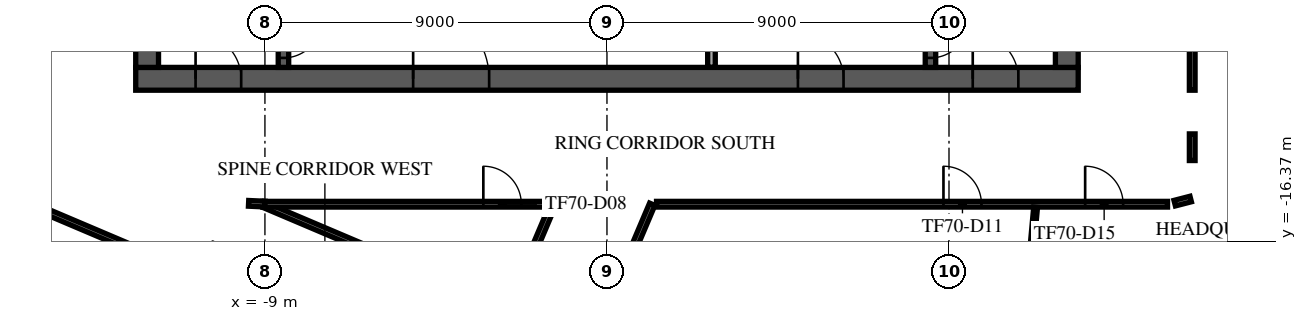
"""IFC4 building model, lengths in metres.
Left out: names, types, materials, properties, quantities, classifications, styles, units other than length and angle.
Written with IfcOpenShell. Run it as: python <this file> out.ifc"""

import sys

from ifc_helpers import new_model, si_unit, direction, frame, frame_2d, origin, place, context, subcontext, project, spatial, rectangle, extrude, element, fill, save


model = new_model("IFC4")
c1 = context("Model", 3, precision=1e-05, world=origin(), true_north=direction((0.0, 1.0)))
c2 = subcontext(c1, "Body", "Model", "MODEL_VIEW")
j1 = project(units=[si_unit("LENGTHUNIT", "METRE"), si_unit("PLANEANGLEUNIT", "RADIAN")], contexts=[c1])
p1 = place(None, origin())
s1 = spatial("IfcSite", under=j1, at=p1, CompositionType="ELEMENT")
p2 = place(p1, origin())
s2 = spatial("IfcBuilding", under=s1, at=p2, CompositionType="ELEMENT")
p3 = place(p2, frame((0.0, 0.0, 300.5)))
s3 = spatial("IfcBuildingStorey", under=s2, at=p3, CompositionType="ELEMENT", Elevation=300.5)
p4 = place(p3, frame((-12.4, -12.1, 0.0), z_axis=(0.0, 0.0, 1.0), x_axis=(1.0, 0.0, 0.0)))
e1 = element("IfcWall", 1, at=p4, inside=s3, PredefinedType="SHEAR", context=c2, shape_type="SweptSolid", body=[
    extrude(rectangle(XDim=24.8, YDim=0.6, at=frame_2d((12.4, 0.0))), origin(), (0.0, 0.0, 1.0), 3.65),
])
p5 = place(p4, frame((7.3, 0.0, 0.0)))
e2 = element("IfcOpeningElement", 2, at=p5, cuts=e1, PredefinedType="OPENING", context=c2, shape_type="SweptSolid", body=[
    extrude(rectangle(XDim=2.0, YDim=2.1, at=frame_2d((1.0, 1.05))), frame((0.0, 0.31, 0.0), z_axis=(0.0, -1.0, 0.0), x_axis=(1.0, 0.0, 0.0)), (0.0, 0.0, 1.0), 0.62),
])
p6 = place(p4, frame((17.425, 0.0, 0.0)))
e3 = element("IfcOpeningElement", 3, at=p6, cuts=e1, PredefinedType="OPENING", context=c2, shape_type="SweptSolid", body=[
    extrude(rectangle(XDim=1.2, YDim=2.1, at=frame_2d((0.6, 1.05))), frame((0.0, 0.31, 0.0), z_axis=(0.0, -1.0, 0.0), x_axis=(1.0, 0.0, 0.0)), (0.0, 0.0, 1.0), 0.62),
])
p7 = place(p4, frame((1.575, 0.0, 0.0)))
e4 = element("IfcOpeningElement", 4, at=p7, cuts=e1, PredefinedType="OPENING", context=c2, shape_type="SweptSolid", body=[
    extrude(rectangle(XDim=1.2, YDim=2.1, at=frame_2d((0.6, 1.05))), frame((0.0, 0.31, 0.0), z_axis=(0.0, -1.0, 0.0), x_axis=(1.0, 0.0, 0.0)), (0.0, 0.0, 1.0), 0.62),
])
p8 = place(p4, frame((22.025, 0.0, 0.0)))
e5 = element("IfcOpeningElement", 5, at=p8, cuts=e1, PredefinedType="OPENING", context=c2, shape_type="SweptSolid", body=[
    extrude(rectangle(XDim=1.2, YDim=2.1, at=frame_2d((0.6, 1.05))), frame((0.0, 0.31, 0.0), z_axis=(0.0, -1.0, 0.0), x_axis=(1.0, 0.0, 0.0)), (0.0, 0.0, 1.0), 0.62),
])
p9 = place(p3, frame((12.1, -11.8, 0.0), z_axis=(0.0, 0.0, 1.0), x_axis=(0.0, 1.0, 0.0)))
e6 = element("IfcWall", 6, at=p9, inside=s3, PredefinedType="SHEAR", context=c2, shape_type="SweptSolid", body=[
    extrude(rectangle(XDim=23.6, YDim=0.6, at=frame_2d((11.8, 0.0))), origin(), (0.0, 0.0, 1.0), 3.65),
])
p10 = place(p9, frame((10.6, 0.0, 0.0)))
e7 = element("IfcOpeningElement", 7, at=p10, cuts=e6, PredefinedType="OPENING", context=c2, shape_type="SweptSolid", body=[
    extrude(rectangle(XDim=2.4, YDim=2.4, at=frame_2d((1.2, 1.2))), frame((0.0, 0.31, 0.0), z_axis=(0.0, -1.0, 0.0), x_axis=(1.0, 0.0, 0.0)), (0.0, 0.0, 1.0), 0.62),
])
p11 = place(p3, frame((-12.1, -11.8, 0.0), z_axis=(0.0, 0.0, 1.0), x_axis=(0.0, 1.0, 0.0)))
e8 = element("IfcWall", 8, at=p11, inside=s3, PredefinedType="SHEAR", context=c2, shape_type="SweptSolid", body=[
    extrude(rectangle(XDim=23.6, YDim=0.6, at=frame_2d((11.8, 0.0))), origin(), (0.0, 0.0, 1.0), 3.65),
])
p12 = place(p11, frame((10.6, 0.0, 0.0)))
e9 = element("IfcOpeningElement", 9, at=p12, cuts=e8, PredefinedType="OPENING", context=c2, shape_type="SweptSolid", body=[
    extrude(rectangle(XDim=2.4, YDim=2.4, at=frame_2d((1.2, 1.2))), frame((0.0, 0.31, 0.0), z_axis=(0.0, -1.0, 0.0), x_axis=(1.0, 0.0, 0.0)), (0.0, 0.0, 1.0), 0.62),
])
p13 = place(p3, frame((-8.512, -4.55, 0.0), z_axis=(0.0, 0.0, 1.0), x_axis=(0.0, -1.0, 0.0)))
e10 = element("IfcWall", 10, at=p13, inside=s3, PredefinedType="SOLIDWALL", context=c2, shape_type="SweptSolid", body=[
    extrude(rectangle(XDim=7.25, YDim=0.275, at=frame_2d((3.625, 0.0))), origin(), (0.0, 0.0, 1.0), 3.65),
])
p14 = place(p13, frame((6.0, 0.0, 0.0)))
e11 = element("IfcOpeningElement", 11, at=p14, cuts=e10, PredefinedType="OPENING", context=c2, shape_type="SweptSolid", body=[
    extrude(rectangle(XDim=1.0, YDim=2.1, at=frame_2d((0.5, 1.05))), frame((0.0, 0.147, 0.0), z_axis=(0.0, -1.0, 0.0), x_axis=(1.0, 0.0, 0.0)), (0.0, 0.0, 1.0), 0.295),
])
p15 = place(p3, frame((8.512, -4.55, 0.0), z_axis=(0.0, 0.0, 1.0), x_axis=(0.0, -1.0, 0.0)))
e12 = element("IfcWall", 12, at=p15, inside=s3, PredefinedType="SOLIDWALL", context=c2, shape_type="SweptSolid", body=[
    extrude(rectangle(XDim=7.25, YDim=0.275, at=frame_2d((3.625, 0.0))), origin(), (0.0, 0.0, 1.0), 3.65),
])
p16 = place(p15, frame((6.0, 0.0, 0.0)))
e13 = element("IfcOpeningElement", 13, at=p16, cuts=e12, PredefinedType="OPENING", context=c2, shape_type="SweptSolid", body=[
    extrude(rectangle(XDim=1.0, YDim=2.1, at=frame_2d((0.5, 1.05))), frame((0.0, 0.147, 0.0), z_axis=(0.0, -1.0, 0.0), x_axis=(1.0, 0.0, 0.0)), (0.0, 0.0, 1.0), 0.295),
])
p17 = place(p3, frame((2.75, -11.795, 0.0), z_axis=(0.0, 0.0, 1.0), x_axis=(0.0, 1.0, 0.0)))
e14 = element("IfcWall", 14, at=p17, inside=s3, PredefinedType="PARTITIONING", context=c2, shape_type="SweptSolid", body=[
    extrude(rectangle(XDim=2.99, YDim=0.2, at=frame_2d((1.495, 0.0))), origin(), (0.0, 0.0, 1.0), 3.65),
])
p18 = place(p3, frame((15.204, -32.515, 0.0), z_axis=(0.0, 0.0, 1.0), x_axis=(0.390728997462, 0.920505758017, 0.0)))
e15 = element("IfcWall", 15, at=p18, inside=s3, PredefinedType="STANDARD", context=c2, shape_type="SweptSolid", body=[
    extrude(rectangle(XDim=47.979, YDim=0.6, at=frame_2d((23.99, 0.0))), origin(), (0.0, 0.0, 1.0), 3.65),
])
p19 = place(p18, frame((1.231, 0.0, 0.9)))
e16 = element("IfcOpeningElement", 16, at=p19, cuts=e15, PredefinedType="OPENING", context=c2, shape_type="SweptSolid", body=[
    extrude(rectangle(XDim=1.9, YDim=2.1, at=frame_2d((0.95, 1.05))), frame((0.0, 0.31, 0.0), z_axis=(0.0, -1.0, 0.0), x_axis=(1.0, 0.0, 0.0)), (0.0, 0.0, 1.0), 0.62),
])
p20 = place(p18, frame((5.593, 0.0, 0.9)))
e17 = element("IfcOpeningElement", 17, at=p20, cuts=e15, PredefinedType="OPENING", context=c2, shape_type="SweptSolid", body=[
    extrude(rectangle(XDim=1.9, YDim=2.1, at=frame_2d((0.95, 1.05))), frame((0.0, 0.31, 0.0), z_axis=(0.0, -1.0, 0.0), x_axis=(1.0, 0.0, 0.0)), (0.0, 0.0, 1.0), 0.62),
])
p21 = place(p18, frame((9.954, 0.0, 0.9)))
e18 = element("IfcOpeningElement", 18, at=p21, cuts=e15, PredefinedType="OPENING", context=c2, shape_type="SweptSolid", body=[
    extrude(rectangle(XDim=1.9, YDim=2.1, at=frame_2d((0.95, 1.05))), frame((0.0, 0.31, 0.0), z_axis=(0.0, -1.0, 0.0), x_axis=(1.0, 0.0, 0.0)), (0.0, 0.0, 1.0), 0.62),
])
p22 = place(p18, frame((14.316, 0.0, 0.9)))
e19 = element("IfcOpeningElement", 19, at=p22, cuts=e15, PredefinedType="OPENING", context=c2, shape_type="SweptSolid", body=[
    extrude(rectangle(XDim=1.9, YDim=2.1, at=frame_2d((0.95, 1.05))), frame((0.0, 0.31, 0.0), z_axis=(0.0, -1.0, 0.0), x_axis=(1.0, 0.0, 0.0)), (0.0, 0.0, 1.0), 0.62),
])
p23 = place(p18, frame((18.678, 0.0, 0.9)))
e20 = element("IfcOpeningElement", 20, at=p23, cuts=e15, PredefinedType="OPENING", context=c2, shape_type="SweptSolid", body=[
    extrude(rectangle(XDim=1.9, YDim=2.1, at=frame_2d((0.95, 1.05))), frame((0.0, 0.31, 0.0), z_axis=(0.0, -1.0, 0.0), x_axis=(1.0, 0.0, 0.0)), (0.0, 0.0, 1.0), 0.62),
])
p24 = place(p18, frame((23.04, 0.0, 0.9)))
e21 = element("IfcOpeningElement", 21, at=p24, cuts=e15, PredefinedType="OPENING", context=c2, shape_type="SweptSolid", body=[
    extrude(rectangle(XDim=1.9, YDim=2.1, at=frame_2d((0.95, 1.05))), frame((0.0, 0.31, 0.0), z_axis=(0.0, -1.0, 0.0), x_axis=(1.0, 0.0, 0.0)), (0.0, 0.0, 1.0), 0.62),
])
p25 = place(p18, frame((27.401, 0.0, 0.9)))
e22 = element("IfcOpeningElement", 22, at=p25, cuts=e15, PredefinedType="OPENING", context=c2, shape_type="SweptSolid", body=[
    extrude(rectangle(XDim=1.9, YDim=2.1, at=frame_2d((0.95, 1.05))), frame((0.0, 0.31, 0.0), z_axis=(0.0, -1.0, 0.0), x_axis=(1.0, 0.0, 0.0)), (0.0, 0.0, 1.0), 0.62),
])
p26 = place(p18, frame((31.763, 0.0, 0.9)))
e23 = element("IfcOpeningElement", 23, at=p26, cuts=e15, PredefinedType="OPENING", context=c2, shape_type="SweptSolid", body=[
    extrude(rectangle(XDim=1.9, YDim=2.1, at=frame_2d((0.95, 1.05))), frame((0.0, 0.31, 0.0), z_axis=(0.0, -1.0, 0.0), x_axis=(1.0, 0.0, 0.0)), (0.0, 0.0, 1.0), 0.62),
])
p27 = place(p18, frame((36.125, 0.0, 0.9)))
e24 = element("IfcOpeningElement", 24, at=p27, cuts=e15, PredefinedType="OPENING", context=c2, shape_type="SweptSolid", body=[
    extrude(rectangle(XDim=1.9, YDim=2.1, at=frame_2d((0.95, 1.05))), frame((0.0, 0.31, 0.0), z_axis=(0.0, -1.0, 0.0), x_axis=(1.0, 0.0, 0.0)), (0.0, 0.0, 1.0), 0.62),
])
p28 = place(p18, frame((40.487, 0.0, 0.9)))
e25 = element("IfcOpeningElement", 25, at=p28, cuts=e15, PredefinedType="OPENING", context=c2, shape_type="SweptSolid", body=[
    extrude(rectangle(XDim=1.9, YDim=2.1, at=frame_2d((0.95, 1.05))), frame((0.0, 0.31, 0.0), z_axis=(0.0, -1.0, 0.0), x_axis=(1.0, 0.0, 0.0)), (0.0, 0.0, 1.0), 0.62),
])
p29 = place(p18, frame((44.848, 0.0, 0.9)))
e26 = element("IfcOpeningElement", 26, at=p29, cuts=e15, PredefinedType="OPENING", context=c2, shape_type="SweptSolid", body=[
    extrude(rectangle(XDim=1.9, YDim=2.1, at=frame_2d((0.95, 1.05))), frame((0.0, 0.31, 0.0), z_axis=(0.0, -1.0, 0.0), x_axis=(1.0, 0.0, 0.0)), (0.0, 0.0, 1.0), 0.62),
])
p30 = place(p3, frame((-23.896, -11.711, 0.0), z_axis=(0.0, 0.0, 1.0), x_axis=(0.920507643781, -0.390724554821, 0.0)))
e27 = element("IfcWall", 27, at=p30, inside=s3, PredefinedType="PARTITIONING", context=c2, shape_type="SweptSolid", body=[
    extrude(rectangle(XDim=34.917, YDim=0.15, at=frame_2d((17.458, 0.0))), origin(), (0.0, 0.0, 1.0), 3.25),
])
p31 = place(p30, frame((7.05, 0.0, 0.0)))
e28 = element("IfcOpeningElement", 28, at=p31, cuts=e27, PredefinedType="OPENING", context=c2, shape_type="SweptSolid", body=[
    extrude(rectangle(XDim=1.8, YDim=2.1, at=frame_2d((0.9, 1.05))), frame((0.0, 0.085, 0.0), z_axis=(0.0, -1.0, 0.0), x_axis=(1.0, 0.0, 0.0)), (0.0, 0.0, 1.0), 0.17),
])
p32 = place(p30, frame((14.27, 0.0, 0.0)))
e29 = element("IfcOpeningElement", 29, at=p32, cuts=e27, PredefinedType="OPENING", context=c2, shape_type="SweptSolid", body=[
    extrude(rectangle(XDim=1.0, YDim=2.1, at=frame_2d((0.5, 1.05))), frame((0.0, 0.085, 0.0), z_axis=(0.0, -1.0, 0.0), x_axis=(1.0, 0.0, 0.0)), (0.0, 0.0, 1.0), 0.17),
])
p33 = place(p30, frame((29.011, 0.0, 0.0)))
e30 = element("IfcOpeningElement", 30, at=p33, cuts=e27, PredefinedType="OPENING", context=c2, shape_type="SweptSolid", body=[
    extrude(rectangle(XDim=1.0, YDim=2.1, at=frame_2d((0.5, 1.05))), frame((0.0, 0.085, 0.0), z_axis=(0.0, -1.0, 0.0), x_axis=(1.0, 0.0, 0.0)), (0.0, 0.0, 1.0), 0.17),
])
p34 = place(p3, frame((-9.054, -15.404, 0.0), z_axis=(0.0, 0.0, 1.0), x_axis=(0.920529927063, -0.390672053495, 0.0)))
e31 = element("IfcWall", 31, at=p34, inside=s3, PredefinedType="PARTITIONING", context=c2, shape_type="SweptSolid", body=[
    extrude(rectangle(XDim=7.029, YDim=0.15, at=frame_2d((3.514, 0.0))), origin(), (0.0, 0.0, 1.0), 3.25),
])
p35 = place(p3, frame((-9.053, -15.4, 0.0), z_axis=(0.0, 0.0, 1.0), x_axis=(1.0, 0.0, 0.0)))
e32 = element("IfcWall", 32, at=p35, inside=s3, PredefinedType="PARTITIONING", context=c2, shape_type="SweptSolid", body=[
    extrude(rectangle(XDim=7.636, YDim=0.15, at=frame_2d((3.818, 0.0))), origin(), (0.0, 0.0, 1.0), 3.25),
])
p36 = place(p35, frame((5.8, 0.0, 0.0)))
e33 = element("IfcOpeningElement", 33, at=p36, cuts=e32, PredefinedType="OPENING", context=c2, shape_type="SweptSolid", body=[
    extrude(rectangle(XDim=1.0, YDim=2.1, at=frame_2d((0.5, 1.05))), frame((0.0, 0.085, 0.0), z_axis=(0.0, -1.0, 0.0), x_axis=(1.0, 0.0, 0.0)), (0.0, 0.0, 1.0), 0.17),
])
p37 = place(p3, frame((-8.996, -15.397, 0.0), z_axis=(0.0, 0.0, 1.0), x_axis=(-0.998938201598, 0.046070265765, 0.0)))
e34 = element("IfcWall", 34, at=p37, inside=s3, PredefinedType="PARTITIONING", context=c2, shape_type="SweptSolid", body=[
    extrude(rectangle(XDim=0.435, YDim=0.15, at=frame_2d((0.217, 0.0))), origin(), (0.0, 0.0, 1.0), 3.65),
])
p38 = place(p3, frame((-2.555, -18.081, 0.0), z_axis=(0.0, 0.0, 1.0), x_axis=(0.39066407996, 0.920533310983, 0.0)))
e35 = element("IfcWall", 35, at=p38, inside=s3, PredefinedType="PARTITIONING", context=c2, shape_type="SweptSolid", body=[
    extrude(rectangle(XDim=2.799, YDim=0.15, at=frame_2d((1.399, 0.0))), origin(), (0.0, 0.0, 1.0), 3.25),
])
p39 = place(p3, frame((-0.346, -19.019, 0.0), z_axis=(0.0, 0.0, 1.0), x_axis=(0.390836874274, 0.920459959861, 0.0)))
e36 = element("IfcWall", 36, at=p39, inside=s3, PredefinedType="PARTITIONING", context=c2, shape_type="SweptSolid", body=[
    extrude(rectangle(XDim=3.932, YDim=0.15, at=frame_2d((1.966, 0.0))), origin(), (0.0, 0.0, 1.0), 3.65),
])
p40 = place(p3, frame((1.304, -15.4, 0.0), z_axis=(0.0, 0.0, 1.0), x_axis=(1.0, 0.0, 0.0)))
e37 = element("IfcWall", 37, at=p40, inside=s3, PredefinedType="PARTITIONING", context=c2, shape_type="SweptSolid", body=[
    extrude(rectangle(XDim=13.446, YDim=0.15, at=frame_2d((6.723, 0.0))), origin(), (0.0, 0.0, 1.0), 3.25),
])
p41 = place(p40, frame((7.55, 0.0, 0.0)))
e38 = element("IfcOpeningElement", 38, at=p41, cuts=e37, PredefinedType="OPENING", context=c2, shape_type="SweptSolid", body=[
    extrude(rectangle(XDim=1.0, YDim=2.1, at=frame_2d((0.5, 1.05))), frame((0.0, 0.085, 0.0), z_axis=(0.0, -1.0, 0.0), x_axis=(1.0, 0.0, 0.0)), (0.0, 0.0, 1.0), 0.17),
])
p42 = place(p40, frame((11.278, 0.0, 0.0)))
e39 = element("IfcOpeningElement", 39, at=p42, cuts=e37, PredefinedType="OPENING", context=c2, shape_type="SweptSolid", body=[
    extrude(rectangle(XDim=1.0, YDim=2.1, at=frame_2d((0.5, 1.05))), frame((0.0, 0.085, 0.0), z_axis=(0.0, -1.0, 0.0), x_axis=(1.0, 0.0, 0.0)), (0.0, 0.0, 1.0), 0.17),
])
p43 = place(p3, frame((15.36, -15.263, 0.0), z_axis=(0.0, 0.0, 1.0), x_axis=(-0.968229060736, -0.250064963452, 0.0)))
e40 = element("IfcWall", 40, at=p43, inside=s3, PredefinedType="PARTITIONING", context=c2, shape_type="SweptSolid", body=[
    extrude(rectangle(XDim=0.435, YDim=0.15, at=frame_2d((0.217, 0.0))), origin(), (0.0, 0.0, 1.0), 3.25),
])
p44 = place(p3, frame((15.4, -14.25, 0.0), z_axis=(0.0, 0.0, 1.0), x_axis=(0.0, 1.0, 0.0)))
e41 = element("IfcWall", 41, at=p44, inside=s3, PredefinedType="PARTITIONING", context=c2, shape_type="SweptSolid", body=[
    extrude(rectangle(XDim=0.7, YDim=0.15, at=frame_2d((0.35, 0.0))), origin(), (0.0, 0.0, 1.0), 3.65),
])
p45 = place(p3, frame((15.4, -12.4, 0.0), z_axis=(0.0, 0.0, 1.0), x_axis=(0.0, 1.0, 0.0)))
e42 = element("IfcWall", 42, at=p45, inside=s3, PredefinedType="PARTITIONING", context=c2, shape_type="SweptSolid", body=[
    extrude(rectangle(XDim=24.725, YDim=0.15, at=frame_2d((12.362, 0.0))), origin(), (0.0, 0.0, 1.0), 3.25),
])
p46 = place(p45, frame((2.8, 0.0, 0.0)))
e43 = element("IfcOpeningElement", 43, at=p46, cuts=e42, PredefinedType="OPENING", context=c2, shape_type="SweptSolid", body=[
    extrude(rectangle(XDim=1.8, YDim=2.1, at=frame_2d((0.9, 1.05))), frame((0.0, 0.085, 0.0), z_axis=(0.0, -1.0, 0.0), x_axis=(1.0, 0.0, 0.0)), (0.0, 0.0, 1.0), 0.17),
])
p47 = place(p45, frame((10.84, 0.0, 0.0)))
e44 = element("IfcOpeningElement", 44, at=p47, cuts=e42, PredefinedType="OPENING", context=c2, shape_type="SweptSolid", body=[
    extrude(rectangle(XDim=1.8, YDim=2.1, at=frame_2d((0.9, 1.05))), frame((0.0, 0.085, 0.0), z_axis=(0.0, -1.0, 0.0), x_axis=(1.0, 0.0, 0.0)), (0.0, 0.0, 1.0), 0.17),
])
p48 = place(p45, frame((17.59, 0.0, 0.0)))
e45 = element("IfcOpeningElement", 45, at=p48, cuts=e42, PredefinedType="OPENING", context=c2, shape_type="SweptSolid", body=[
    extrude(rectangle(XDim=1.0, YDim=2.1, at=frame_2d((0.5, 1.05))), frame((0.0, 0.085, 0.0), z_axis=(0.0, -1.0, 0.0), x_axis=(1.0, 0.0, 0.0)), (0.0, 0.0, 1.0), 0.17),
])
p49 = place(p45, frame((20.086, 0.0, 0.0)))
e46 = element("IfcOpeningElement", 46, at=p49, cuts=e42, PredefinedType="OPENING", context=c2, shape_type="SweptSolid", body=[
    extrude(rectangle(XDim=1.8, YDim=2.1, at=frame_2d((0.9, 1.05))), frame((0.0, 0.085, 0.0), z_axis=(0.0, -1.0, 0.0), x_axis=(1.0, 0.0, 0.0)), (0.0, 0.0, 1.0), 0.17),
])
p50 = place(p3, frame((9.995, -29.577, 0.0), z_axis=(0.0, 0.0, 1.0), x_axis=(0.090666368484, 0.995881323063, 0.0)))
e47 = element("IfcWall", 47, at=p50, inside=s3, PredefinedType="PARTITIONING", context=c2, shape_type="SweptSolid", body=[
    extrude(rectangle(XDim=14.156, YDim=0.1, at=frame_2d((7.078, 0.0))), origin(), (0.0, 0.0, 1.0), 3.65),
])
p51 = place(p5, origin())
e48 = element("IfcDoor", 48, at=p51, inside=s3, OperationType="SINGLE_SWING_LEFT", PredefinedType="DOOR", context=c2, shape_type="SweptSolid", body=[
    extrude(rectangle(XDim=2.0, YDim=2.1, at=frame_2d((1.0, 1.05))), frame((0.0, 0.025, 0.0), z_axis=(0.0, -1.0, 0.0), x_axis=(1.0, 0.0, 0.0)), (0.0, 0.0, 1.0), 0.05),
])
fill(e2, e48)
p52 = place(p6, origin())
e49 = element("IfcDoor", 49, at=p52, inside=s3, OperationType="SINGLE_SWING_LEFT", PredefinedType="DOOR", context=c2, shape_type="SweptSolid", body=[
    extrude(rectangle(XDim=1.2, YDim=2.1, at=frame_2d((0.6, 1.05))), frame((0.0, 0.025, 0.0), z_axis=(0.0, -1.0, 0.0), x_axis=(1.0, 0.0, 0.0)), (0.0, 0.0, 1.0), 0.05),
])
fill(e3, e49)
p53 = place(p7, origin())
e50 = element("IfcDoor", 50, at=p53, inside=s3, OperationType="SINGLE_SWING_LEFT", PredefinedType="DOOR", context=c2, shape_type="SweptSolid", body=[
    extrude(rectangle(XDim=1.2, YDim=2.1, at=frame_2d((0.6, 1.05))), frame((0.0, 0.025, 0.0), z_axis=(0.0, -1.0, 0.0), x_axis=(1.0, 0.0, 0.0)), (0.0, 0.0, 1.0), 0.05),
])
fill(e4, e50)
p54 = place(p8, origin())
e51 = element("IfcDoor", 51, at=p54, inside=s3, OperationType="SINGLE_SWING_LEFT", PredefinedType="DOOR", context=c2, shape_type="SweptSolid", body=[
    extrude(rectangle(XDim=1.2, YDim=2.1, at=frame_2d((0.6, 1.05))), frame((0.0, 0.025, 0.0), z_axis=(0.0, -1.0, 0.0), x_axis=(1.0, 0.0, 0.0)), (0.0, 0.0, 1.0), 0.05),
])
fill(e5, e51)
p55 = place(p14, origin())
e52 = element("IfcDoor", 52, at=p55, inside=s3, OperationType="SINGLE_SWING_LEFT", PredefinedType="DOOR", context=c2, shape_type="SweptSolid", body=[
    extrude(rectangle(XDim=1.0, YDim=2.1, at=frame_2d((0.5, 1.05))), frame((0.0, 0.025, 0.0), z_axis=(0.0, -1.0, 0.0), x_axis=(1.0, 0.0, 0.0)), (0.0, 0.0, 1.0), 0.05),
])
fill(e11, e52)
p56 = place(p16, origin())
e53 = element("IfcDoor", 53, at=p56, inside=s3, OperationType="SINGLE_SWING_LEFT", PredefinedType="DOOR", context=c2, shape_type="SweptSolid", body=[
    extrude(rectangle(XDim=1.0, YDim=2.1, at=frame_2d((0.5, 1.05))), frame((0.0, 0.025, 0.0), z_axis=(0.0, -1.0, 0.0), x_axis=(1.0, 0.0, 0.0)), (0.0, 0.0, 1.0), 0.05),
])
fill(e13, e53)
p57 = place(p36, frame((1.0, 0.0, 0.0), z_axis=(0.0, 0.0, 1.0), x_axis=(-1.0, 0.0, 0.0)))
e54 = element("IfcDoor", 54, at=p57, inside=s3, OperationType="SINGLE_SWING_RIGHT", PredefinedType="DOOR", context=c2, shape_type="SweptSolid", body=[
    extrude(rectangle(XDim=1.0, YDim=2.1, at=frame_2d((0.5, 1.05))), frame((0.0, 0.025, 0.0), z_axis=(0.0, -1.0, 0.0), x_axis=(1.0, 0.0, 0.0)), (0.0, 0.0, 1.0), 0.05),
])
fill(e33, e54)
p58 = place(p41, frame((1.0, 0.0, 0.0), z_axis=(0.0, 0.0, 1.0), x_axis=(-1.0, 0.0, 0.0)))
e55 = element("IfcDoor", 55, at=p58, inside=s3, OperationType="SINGLE_SWING_RIGHT", PredefinedType="DOOR", context=c2, shape_type="SweptSolid", body=[
    extrude(rectangle(XDim=1.0, YDim=2.1, at=frame_2d((0.5, 1.05))), frame((0.0, 0.025, 0.0), z_axis=(0.0, -1.0, 0.0), x_axis=(1.0, 0.0, 0.0)), (0.0, 0.0, 1.0), 0.05),
])
fill(e38, e55)
p59 = place(p42, frame((1.0, 0.0, 0.0), z_axis=(0.0, 0.0, 1.0), x_axis=(-1.0, 0.0, 0.0)))
e56 = element("IfcDoor", 56, at=p59, inside=s3, OperationType="SINGLE_SWING_RIGHT", PredefinedType="DOOR", context=c2, shape_type="SweptSolid", body=[
    extrude(rectangle(XDim=1.0, YDim=2.1, at=frame_2d((0.5, 1.05))), frame((0.0, 0.025, 0.0), z_axis=(0.0, -1.0, 0.0), x_axis=(1.0, 0.0, 0.0)), (0.0, 0.0, 1.0), 0.05),
])
fill(e39, e56)
save(model, sys.argv[1])
